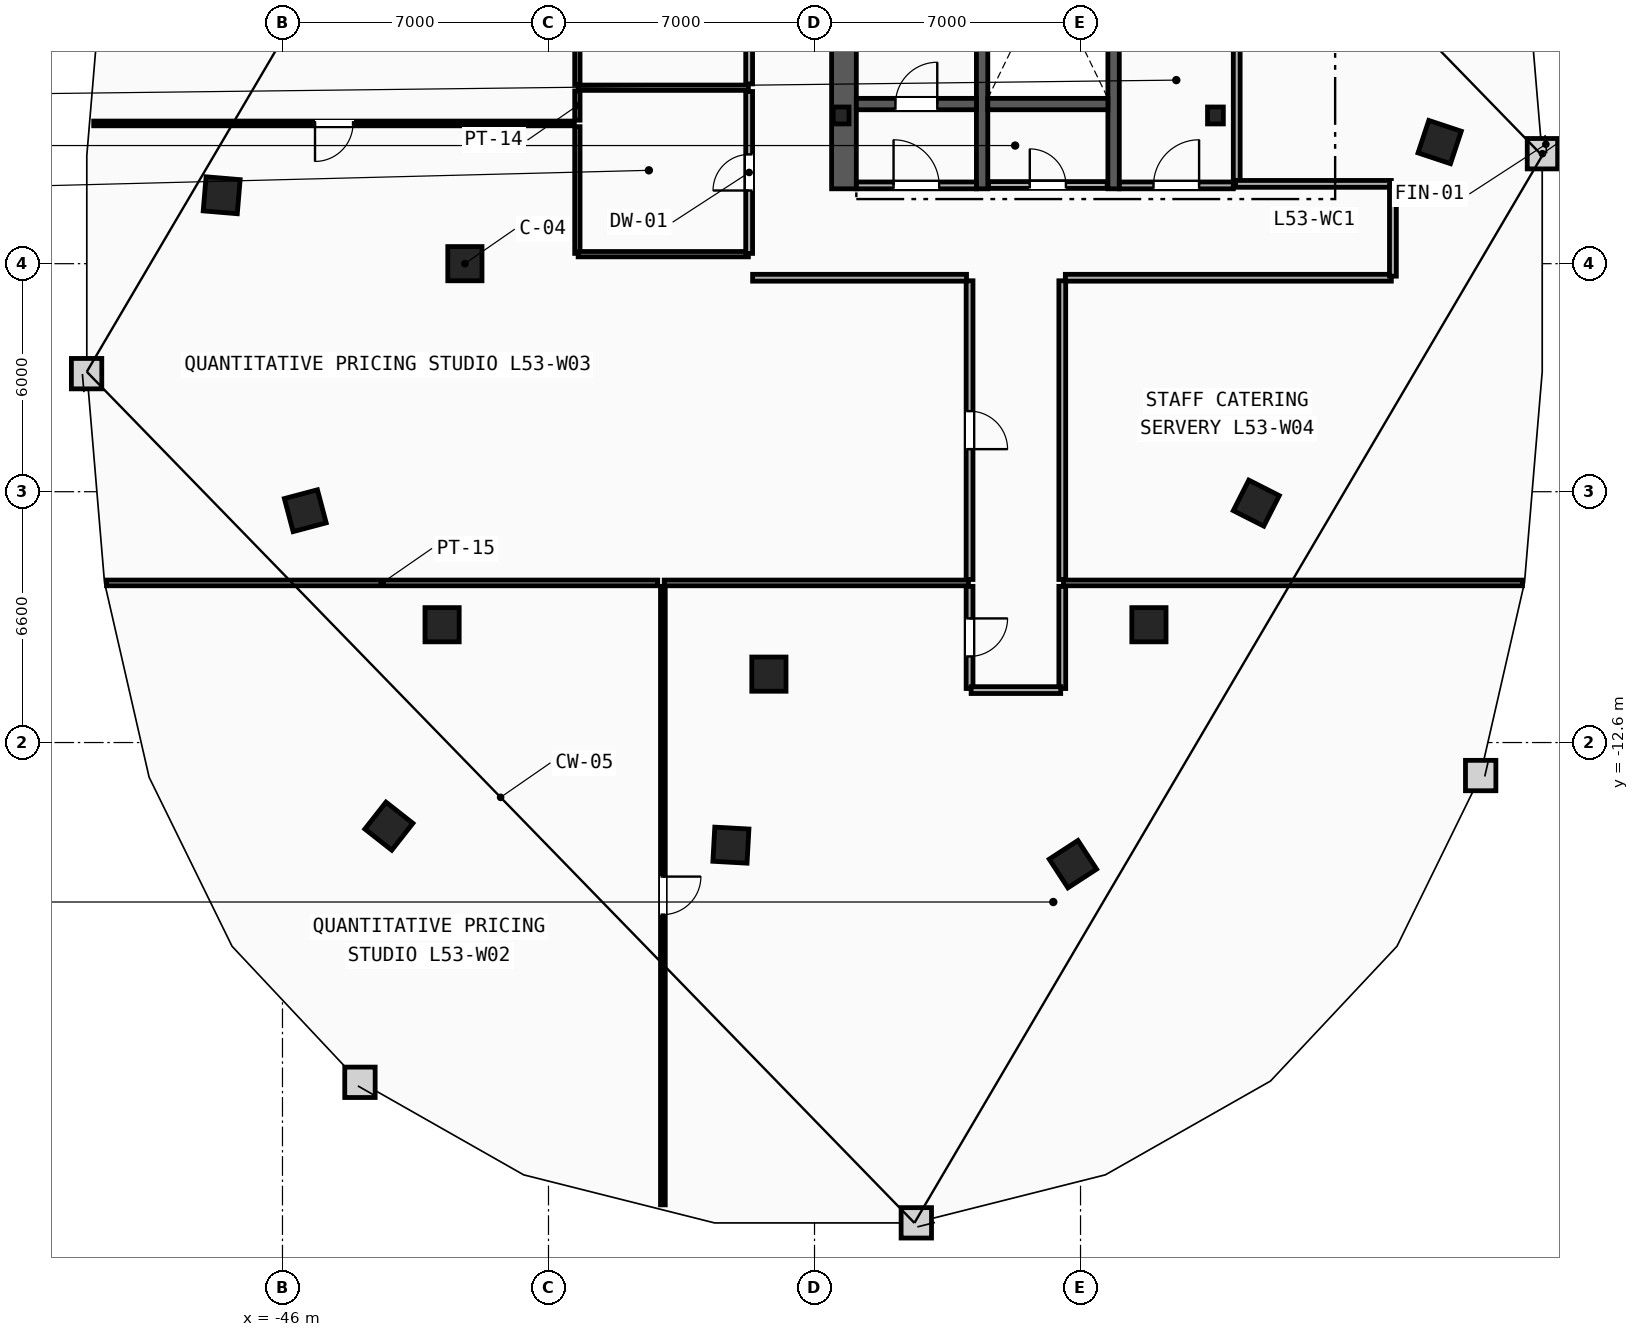
"""IFC4 building model, lengths in metres.
Left out: names, types, materials, properties, quantities, classifications, styles, units other than length and angle.
Written with IfcOpenShell. Run it as: python <this file> out.ifc"""

import sys

from ifc_helpers import new_model, si_unit, direction, frame, frame_2d, origin, origin_2d, place, context, subcontext, project, spatial, rectangle, i_section, extrude, element, fill, save


model = new_model("IFC4")
c1 = context("Model", 3, precision=1e-05, world=origin(), true_north=direction((0.0, 1.0)))
c2 = subcontext(c1, "Body", "Model", "MODEL_VIEW")
j1 = project(units=[si_unit("LENGTHUNIT", "METRE"), si_unit("PLANEANGLEUNIT", "RADIAN")], contexts=[c1])
p1 = place(None, origin())
s1 = spatial("IfcSite", under=j1, at=p1, CompositionType="ELEMENT")
p2 = place(p1, origin())
s2 = spatial("IfcBuilding", under=s1, at=p2, CompositionType="ELEMENT")
p3 = place(p2, frame((0.0, 0.0, 202.6)))
s3 = spatial("IfcBuildingStorey", under=s2, at=p3, CompositionType="ELEMENT", Elevation=202.6)
for number, where, z_axis, x_axis in (
    (1, (-31.3, 3.9, 0.0), (0.0, 0.0, 1.0), (1.0, 0.0, 0.0)),
    (2, (-21.45, 3.9, 0.0), (0.0, 0.0, 1.0), (1.0, 0.0, 0.0)),
):
    element("IfcColumn", number, at=place(p3, frame(where, z_axis=z_axis, x_axis=x_axis)), inside=s3, PredefinedType="COLUMN", context=c2, shape_type="SweptSolid", body=[
        extrude(i_section(OverallWidth=0.416, OverallDepth=0.446, WebThickness=0.039, FlangeThickness=0.063, FilletRadius=0.018, at=origin_2d()), origin(), (0.0, 0.0, 1.0), 3.6),
    ])
for number, where, z_axis, x_axis in (
    (3, (-41.2, 0.0, 0.0), (0.0, 0.0, 1.0), (1.0, 0.0, 0.0)),
    (4, (-41.8, -9.5, 0.0), (0.0, 0.0, 1.0), (1.0, 0.0, 0.0)),
    (5, (-33.2, -10.8, 0.0), (0.0, 0.0, 1.0), (1.0, 0.0, 0.0)),
    (6, (-23.2, -9.5, 0.0), (0.0, 0.0, 1.0), (1.0, 0.0, 0.0)),
    (7, (-15.55, 3.2, 0.0), (0.0, 0.0, 1.0), (0.315, 0.949, 0.0)),
    (8, (-47.6, 1.8, 0.0), (0.0, 0.0, 1.0), (-0.084, -0.997, 0.0)),
    (9, (-45.4, -6.5, 0.0), (0.0, 0.0, 1.0), (0.256, -0.967, 0.0)),
    (10, (-43.2, -14.8, 0.0), (0.0, 0.0, 1.0), (0.786, -0.618, 0.0)),
    (11, (-34.2, -15.3, 0.0), (0.0, 0.0, 1.0), (0.998, -0.055, 0.0)),
    (12, (-25.2, -15.8, 0.0), (0.0, 0.0, 1.0), (0.838, 0.546, 0.0)),
    (13, (-20.375, -6.3, 0.0), (0.0, 0.0, 1.0), (0.453, 0.892, 0.0)),
):
    element("IfcColumn", number, at=place(p3, frame(where, z_axis=z_axis, x_axis=x_axis)), inside=s3, PredefinedType="COLUMN", context=c2, shape_type="SweptSolid", body=[
        extrude(rectangle(XDim=0.9, YDim=0.9, at=origin_2d()), origin(), (0.0, 0.0, 1.0), 3.6),
    ])
p4 = place(p3, frame((-31.225, 1.97, 0.0), z_axis=(0.0, 0.0, 1.0), x_axis=(0.0, 1.0, 0.0)))
e14 = element("IfcWall", 14, at=p4, inside=s3, PredefinedType="SHEAR", context=c2, shape_type="SweptSolid", body=[
    extrude(rectangle(XDim=13.33, YDim=0.65, at=frame_2d((6.665, 0.0))), origin(), (0.0, 0.0, 1.0), 3.34),
])
for number, where, z_axis, x_axis in (
    (15, (-27.59, 1.97, 0.0), (0.0, 0.0, 1.0), (0.0, 1.0, 0.0)),
    (16, (-24.13, 1.97, 0.0), (0.0, 0.0, 1.0), (0.0, 1.0, 0.0)),
):
    element("IfcWall", number, at=place(p3, frame(where, z_axis=z_axis, x_axis=x_axis)), inside=s3, PredefinedType="SHEAR", context=c2, shape_type="SweptSolid", body=[
        extrude(rectangle(XDim=10.68, YDim=0.3, at=frame_2d((5.34, 0.0))), origin(), (0.0, 0.0, 1.0), 3.34),
    ])
p5 = place(p3, frame((-30.9, 4.2, 0.0), z_axis=(0.0, 0.0, 1.0), x_axis=(1.0, 0.0, 0.0)))
e17 = element("IfcWall", 17, at=p5, inside=s3, PredefinedType="SHEAR", context=c2, shape_type="SweptSolid", body=[
    extrude(rectangle(XDim=3.16, YDim=0.3, at=frame_2d((1.58, 0.0))), origin(), (0.0, 0.0, 1.0), 3.34),
])
p6 = place(p5, frame((1.03, 0.0, 0.0)))
e18 = element("IfcOpeningElement", 18, at=p6, cuts=e17, PredefinedType="OPENING", context=c2, shape_type="SweptSolid", body=[
    extrude(rectangle(XDim=1.1, YDim=2.15, at=frame_2d((0.55, 1.075))), frame((0.0, 0.16, 0.0), z_axis=(0.0, -1.0, 0.0), x_axis=(1.0, 0.0, 0.0)), (0.0, 0.0, 1.0), 0.32),
])
p7 = place(p3, frame((-27.44, 4.2, 0.0), z_axis=(0.0, 0.0, 1.0), x_axis=(1.0, 0.0, 0.0)))
e19 = element("IfcWall", 19, at=p7, inside=s3, PredefinedType="SHEAR", context=c2, shape_type="SweptSolid", body=[
    extrude(rectangle(XDim=3.16, YDim=0.3, at=frame_2d((1.58, 0.0))), origin(), (0.0, 0.0, 1.0), 3.34),
])
p8 = place(p3, frame((-20.89, 2.15, 0.0), z_axis=(0.0, 0.0, 1.0), x_axis=(0.0, 1.0, 0.0)))
e20 = element("IfcWall", 20, at=p8, inside=s3, PredefinedType="PARTITIONING", context=c2, shape_type="SweptSolid", body=[
    extrude(rectangle(XDim=5.3, YDim=0.18, at=frame_2d((2.65, 0.0))), origin(), (0.0, 0.0, 1.0), 3.34),
])
p9 = place(p3, frame((-23.98, 2.06, 0.0), z_axis=(0.0, 0.0, 1.0), x_axis=(1.0, 0.0, 0.0)))
e21 = element("IfcWall", 21, at=p9, inside=s3, PredefinedType="PARTITIONING", context=c2, shape_type="SweptSolid", body=[
    extrude(rectangle(XDim=3.0, YDim=0.18, at=frame_2d((1.5, 0.0))), origin(), (0.0, 0.0, 1.0), 3.34),
])
p10 = place(p9, frame((0.9, 0.0, 0.0)))
e22 = element("IfcOpeningElement", 22, at=p10, cuts=e21, PredefinedType="OPENING", context=c2, shape_type="SweptSolid", body=[
    extrude(rectangle(XDim=1.2, YDim=2.15, at=frame_2d((0.6, 1.075))), frame((0.0, 0.1, 0.0), z_axis=(0.0, -1.0, 0.0), x_axis=(1.0, 0.0, 0.0)), (0.0, 0.0, 1.0), 0.2),
])
p11 = place(p3, frame((-30.9, 2.06, 0.0), z_axis=(0.0, 0.0, 1.0), x_axis=(1.0, 0.0, 0.0)))
e23 = element("IfcWall", 23, at=p11, inside=s3, PredefinedType="PARTITIONING", context=c2, shape_type="SweptSolid", body=[
    extrude(rectangle(XDim=3.16, YDim=0.18, at=frame_2d((1.58, 0.0))), origin(), (0.0, 0.0, 1.0), 3.34),
])
p12 = place(p11, frame((0.98, 0.0, 0.0)))
e24 = element("IfcOpeningElement", 24, at=p12, cuts=e23, PredefinedType="OPENING", context=c2, shape_type="SweptSolid", body=[
    extrude(rectangle(XDim=1.2, YDim=2.15, at=frame_2d((0.6, 1.075))), frame((0.0, 0.1, 0.0), z_axis=(0.0, -1.0, 0.0), x_axis=(1.0, 0.0, 0.0)), (0.0, 0.0, 1.0), 0.2),
])
p13 = place(p3, frame((-27.42, 2.07, 0.0), z_axis=(0.0, 0.0, 1.0), x_axis=(1.0, 0.0, 0.0)))
e25 = element("IfcWall", 25, at=p13, inside=s3, PredefinedType="PARTITIONING", context=c2, shape_type="SweptSolid", body=[
    extrude(rectangle(XDim=3.12, YDim=0.18, at=frame_2d((1.56, 0.0))), origin(), (0.0, 0.0, 1.0), 3.34),
])
p14 = place(p13, frame((1.085, 0.0, 0.0)))
e26 = element("IfcOpeningElement", 26, at=p14, cuts=e25, PredefinedType="OPENING", context=c2, shape_type="SweptSolid", body=[
    extrude(rectangle(XDim=0.95, YDim=2.1, at=frame_2d((0.475, 1.05))), frame((0.0, 0.1, 0.0), z_axis=(0.0, -1.0, 0.0), x_axis=(1.0, 0.0, 0.0)), (0.0, 0.0, 1.0), 0.2),
])
p15 = place(p3, frame((-38.24, 0.27, 0.0), z_axis=(0.0, 0.0, 1.0), x_axis=(0.0, 1.0, 0.0)))
e27 = element("IfcWall", 27, at=p15, inside=s3, PredefinedType="PARTITIONING", context=c2, shape_type="SweptSolid", body=[
    extrude(rectangle(XDim=3.335, YDim=0.14, at=frame_2d((1.667, 0.0))), origin(), (0.0, 0.0, 1.0), 3.34),
])
p16 = place(p3, frame((-38.24, 3.775, 0.0), z_axis=(0.0, 0.0, 1.0), x_axis=(0.0, 1.0, 0.0)))
e28 = element("IfcWall", 28, at=p16, inside=s3, PredefinedType="PARTITIONING", context=c2, shape_type="SweptSolid", body=[
    extrude(rectangle(XDim=0.77, YDim=0.14, at=frame_2d((0.385, 0.0))), origin(), (0.0, 0.0, 1.0), 3.34),
])
p17 = place(p3, frame((-38.24, 4.715, 0.0), z_axis=(0.0, 0.0, 1.0), x_axis=(0.0, 1.0, 0.0)))
e29 = element("IfcWall", 29, at=p17, inside=s3, PredefinedType="PARTITIONING", context=c2, shape_type="SweptSolid", body=[
    extrude(rectangle(XDim=3.74, YDim=0.14, at=frame_2d((1.87, 0.0))), origin(), (0.0, 0.0, 1.0), 3.34),
])
for number, where, z_axis, x_axis in (
    (30, (-38.22, 0.25, 0.0), (0.0, 0.0, 1.0), (1.0, 0.0, 0.0)),
    (31, (-38.22, 4.63, 0.0), (0.0, 0.0, 1.0), (1.0, 0.0, 0.0)),
):
    element("IfcWall", number, at=place(p3, frame(where, z_axis=z_axis, x_axis=x_axis)), inside=s3, PredefinedType="PARTITIONING", context=c2, shape_type="SweptSolid", body=[
        extrude(rectangle(XDim=4.48, YDim=0.14, at=frame_2d((2.24, 0.0))), origin(), (0.0, 0.0, 1.0), 3.34),
    ])
p18 = place(p3, frame((-33.72, 0.27, 0.0), z_axis=(0.0, 0.0, 1.0), x_axis=(0.0, 1.0, 0.0)))
e32 = element("IfcWall", 32, at=p18, inside=s3, PredefinedType="PARTITIONING", context=c2, shape_type="SweptSolid", body=[
    extrude(rectangle(XDim=4.26, YDim=0.18, at=frame_2d((2.13, 0.0))), origin(), (0.0, 0.0, 1.0), 3.34),
])
p19 = place(p18, frame((1.655, 0.0, 0.0)))
e33 = element("IfcOpeningElement", 33, at=p19, cuts=e32, PredefinedType="OPENING", context=c2, shape_type="SweptSolid", body=[
    extrude(rectangle(XDim=0.95, YDim=2.1, at=frame_2d((0.475, 1.05))), frame((0.0, 0.1, 0.0), z_axis=(0.0, -1.0, 0.0), x_axis=(1.0, 0.0, 0.0)), (0.0, 0.0, 1.0), 0.2),
])
p20 = place(p3, frame((-33.72, 4.73, 0.0), z_axis=(0.0, 0.0, 1.0), x_axis=(0.0, 1.0, 0.0)))
e34 = element("IfcWall", 34, at=p20, inside=s3, PredefinedType="PARTITIONING", context=c2, shape_type="SweptSolid", body=[
    extrude(rectangle(XDim=4.16, YDim=0.18, at=frame_2d((2.08, 0.0))), origin(), (0.0, 0.0, 1.0), 3.34),
])
p21 = place(p20, frame((1.58, 0.0, 0.0)))
e35 = element("IfcOpeningElement", 35, at=p21, cuts=e34, PredefinedType="OPENING", context=c2, shape_type="SweptSolid", body=[
    extrude(rectangle(XDim=1.0, YDim=2.15, at=frame_2d((0.5, 1.075))), frame((0.0, 0.1, 0.0), z_axis=(0.0, -1.0, 0.0), x_axis=(1.0, 0.0, 0.0)), (0.0, 0.0, 1.0), 0.2),
])
p22 = place(p3, frame((-50.63, -8.4, 0.0), z_axis=(0.0, 0.0, 1.0), x_axis=(1.0, 0.0, 0.0)))
e36 = element("IfcWall", 36, at=p22, inside=s3, PredefinedType="PARTITIONING", context=c2, shape_type="SweptSolid", body=[
    extrude(rectangle(XDim=14.505, YDim=0.15, at=frame_2d((7.252, 0.0))), origin(), (0.0, 0.0, 1.0), 3.34),
])
p23 = place(p3, frame((-35.955, -8.4, 0.0), z_axis=(0.0, 0.0, 1.0), x_axis=(1.0, 0.0, 0.0)))
e37 = element("IfcWall", 37, at=p23, inside=s3, PredefinedType="PARTITIONING", context=c2, shape_type="SweptSolid", body=[
    extrude(rectangle(XDim=8.005, YDim=0.15, at=frame_2d((4.002, 0.0))), origin(), (0.0, 0.0, 1.0), 3.34),
])
p24 = place(p3, frame((-25.45, -8.4, 0.0), z_axis=(0.0, 0.0, 1.0), x_axis=(1.0, 0.0, 0.0)))
e38 = element("IfcWall", 38, at=p24, inside=s3, PredefinedType="PARTITIONING", context=c2, shape_type="SweptSolid", body=[
    extrude(rectangle(XDim=12.08, YDim=0.15, at=frame_2d((6.04, 0.0))), origin(), (0.0, 0.0, 1.0), 3.34),
])
p25 = place(p3, frame((-27.92, -8.49, 0.0), z_axis=(0.0, 0.0, 1.0), x_axis=(0.0, -1.0, 0.0)))
e39 = element("IfcWall", 39, at=p25, inside=s3, PredefinedType="PARTITIONING", context=c2, shape_type="SweptSolid", body=[
    extrude(rectangle(XDim=2.688, YDim=0.18, at=frame_2d((1.344, 0.0))), origin(), (0.0, 0.0, 1.0), 3.34),
])
p26 = place(p25, frame((0.844, 0.0, 0.0)))
e40 = element("IfcOpeningElement", 40, at=p26, cuts=e39, PredefinedType="OPENING", context=c2, shape_type="SweptSolid", body=[
    extrude(rectangle(XDim=1.0, YDim=2.15, at=frame_2d((0.5, 1.075))), frame((0.0, 0.1, 0.0), z_axis=(0.0, -1.0, 0.0), x_axis=(1.0, 0.0, 0.0)), (0.0, 0.0, 1.0), 0.2),
])
p27 = place(p3, frame((-25.48, -11.178, 0.0), z_axis=(0.0, 0.0, 1.0), x_axis=(0.0, 1.0, 0.0)))
e41 = element("IfcWall", 41, at=p27, inside=s3, PredefinedType="PARTITIONING", context=c2, shape_type="SweptSolid", body=[
    extrude(rectangle(XDim=2.688, YDim=0.18, at=frame_2d((1.344, 0.0))), origin(), (0.0, 0.0, 1.0), 3.34),
])
p28 = place(p3, frame((-27.878, -11.22, 0.0), z_axis=(0.0, 0.0, 1.0), x_axis=(1.0, 0.0, 0.0)))
e42 = element("IfcWall", 42, at=p28, inside=s3, PredefinedType="PARTITIONING", context=c2, shape_type="SweptSolid", body=[
    extrude(rectangle(XDim=2.357, YDim=0.18, at=frame_2d((1.178, 0.0))), origin(), (0.0, 0.0, 1.0), 3.34),
])
p29 = place(p3, frame((-27.92, -0.45, 0.0), z_axis=(0.0, 0.0, 1.0), x_axis=(0.0, -1.0, 0.0)))
e43 = element("IfcWall", 43, at=p29, inside=s3, PredefinedType="PARTITIONING", context=c2, shape_type="SweptSolid", body=[
    extrude(rectangle(XDim=7.86, YDim=0.18, at=frame_2d((3.93, 0.0))), origin(), (0.0, 0.0, 1.0), 3.34),
])
p30 = place(p29, frame((3.43, 0.0, 0.0)))
e44 = element("IfcOpeningElement", 44, at=p30, cuts=e43, PredefinedType="OPENING", context=c2, shape_type="SweptSolid", body=[
    extrude(rectangle(XDim=1.0, YDim=2.15, at=frame_2d((0.5, 1.075))), frame((0.0, 0.1, 0.0), z_axis=(0.0, -1.0, 0.0), x_axis=(1.0, 0.0, 0.0)), (0.0, 0.0, 1.0), 0.2),
])
p31 = place(p3, frame((-33.628, -0.37, 0.0), z_axis=(0.0, 0.0, 1.0), x_axis=(1.0, 0.0, 0.0)))
e45 = element("IfcWall", 45, at=p31, inside=s3, PredefinedType="PARTITIONING", context=c2, shape_type="SweptSolid", body=[
    extrude(rectangle(XDim=5.628, YDim=0.18, at=frame_2d((2.814, 0.0))), origin(), (0.0, 0.0, 1.0), 3.34),
])
p32 = place(p3, frame((-25.4, -0.37, 0.0), z_axis=(0.0, 0.0, 1.0), x_axis=(1.0, 0.0, 0.0)))
e46 = element("IfcWall", 46, at=p32, inside=s3, PredefinedType="PARTITIONING", context=c2, shape_type="SweptSolid", body=[
    extrude(rectangle(XDim=8.578, YDim=0.18, at=frame_2d((4.289, 0.0))), origin(), (0.0, 0.0, 1.0), 3.34),
])
p33 = place(p3, frame((-25.48, -8.31, 0.0), z_axis=(0.0, 0.0, 1.0), x_axis=(0.0, 1.0, 0.0)))
e47 = element("IfcWall", 47, at=p33, inside=s3, PredefinedType="PARTITIONING", context=c2, shape_type="SweptSolid", body=[
    extrude(rectangle(XDim=7.86, YDim=0.18, at=frame_2d((3.93, 0.0))), origin(), (0.0, 0.0, 1.0), 3.34),
])
p34 = place(p3, frame((-16.822, 2.1, 0.0), z_axis=(0.0, 0.0, 1.0), x_axis=(-1.0, 0.0, 0.0)))
e48 = element("IfcWall", 48, at=p34, inside=s3, PredefinedType="PARTITIONING", context=c2, shape_type="SweptSolid", body=[
    extrude(rectangle(XDim=4.098, YDim=0.18, at=frame_2d((2.049, 0.0))), origin(), (0.0, 0.0, 1.0), 3.34),
])
p35 = place(p3, frame((-16.78, -0.329, 0.0), z_axis=(0.0, 0.0, 1.0), x_axis=(0.0, 1.0, 0.0)))
e49 = element("IfcWall", 49, at=p35, inside=s3, PredefinedType="PARTITIONING", context=c2, shape_type="SweptSolid", body=[
    extrude(rectangle(XDim=2.387, YDim=0.18, at=frame_2d((1.194, 0.0))), origin(), (0.0, 0.0, 1.0), 3.34),
])
p36 = place(p3, frame((-35.99, -8.49, 0.0), z_axis=(0.0, 0.0, 1.0), x_axis=(0.0, -1.0, 0.0)))
e50 = element("IfcWall", 50, at=p36, inside=s3, PredefinedType="PARTITIONING", context=c2, shape_type="SweptSolid", body=[
    extrude(rectangle(XDim=16.275, YDim=0.125, at=frame_2d((8.137, 0.0))), origin(), (0.0, 0.0, 1.0), 3.34),
])
p37 = place(p36, frame((7.637, 0.0, 0.0)))
e51 = element("IfcOpeningElement", 51, at=p37, cuts=e50, PredefinedType="OPENING", context=c2, shape_type="SweptSolid", body=[
    extrude(rectangle(XDim=1.0, YDim=2.15, at=frame_2d((0.5, 1.075))), frame((0.0, 0.073, 0.0), z_axis=(0.0, -1.0, 0.0), x_axis=(1.0, 0.0, 0.0)), (0.0, 0.0, 1.0), 0.145),
])
p38 = place(p3, frame((-38.32, 3.69, 0.0), z_axis=(0.0, 0.0, 1.0), x_axis=(-1.0, 0.0, 0.0)))
e52 = element("IfcWall", 52, at=p38, inside=s3, PredefinedType="PARTITIONING", context=c2, shape_type="SweptSolid", body=[
    extrude(rectangle(XDim=12.647, YDim=0.125, at=frame_2d((6.324, 0.0))), origin(), (0.0, 0.0, 1.0), 3.34),
])
p39 = place(p38, frame((5.824, 0.0, 0.0)))
e53 = element("IfcOpeningElement", 53, at=p39, cuts=e52, PredefinedType="OPENING", context=c2, shape_type="SweptSolid", body=[
    extrude(rectangle(XDim=1.0, YDim=2.15, at=frame_2d((0.5, 1.075))), frame((0.0, 0.073, 0.0), z_axis=(0.0, -1.0, 0.0), x_axis=(1.0, 0.0, 0.0)), (0.0, 0.0, 1.0), 0.145),
])
p40 = place(p6, origin())
e54 = element("IfcDoor", 54, at=p40, inside=s3, OperationType="SINGLE_SWING_RIGHT", PredefinedType="DOOR", context=c2, shape_type="SweptSolid", body=[
    extrude(rectangle(XDim=1.1, YDim=2.15, at=frame_2d((0.55, 1.075))), frame((0.0, 0.025, 0.0), z_axis=(0.0, -1.0, 0.0), x_axis=(1.0, 0.0, 0.0)), (0.0, 0.0, 1.0), 0.05),
])
fill(e18, e54)
p41 = place(p10, origin())
e55 = element("IfcDoor", 55, at=p41, inside=s3, OperationType="SINGLE_SWING_RIGHT", PredefinedType="DOOR", context=c2, shape_type="SweptSolid", body=[
    extrude(rectangle(XDim=1.2, YDim=2.15, at=frame_2d((0.6, 1.075))), frame((0.0, 0.025, 0.0), z_axis=(0.0, -1.0, 0.0), x_axis=(1.0, 0.0, 0.0)), (0.0, 0.0, 1.0), 0.05),
])
fill(e22, e55)
p42 = place(p12, origin())
e56 = element("IfcDoor", 56, at=p42, inside=s3, OperationType="SINGLE_SWING_LEFT", PredefinedType="DOOR", context=c2, shape_type="SweptSolid", body=[
    extrude(rectangle(XDim=1.2, YDim=2.15, at=frame_2d((0.6, 1.075))), frame((0.0, 0.025, 0.0), z_axis=(0.0, -1.0, 0.0), x_axis=(1.0, 0.0, 0.0)), (0.0, 0.0, 1.0), 0.05),
])
fill(e24, e56)
p43 = place(p37, origin())
e57 = element("IfcDoor", 57, at=p43, inside=s3, OperationType="SINGLE_SWING_LEFT", PredefinedType="DOOR", context=c2, shape_type="SweptSolid", body=[
    extrude(rectangle(XDim=1.0, YDim=2.15, at=frame_2d((0.5, 1.075))), frame((0.0, 0.025, 0.0), z_axis=(0.0, -1.0, 0.0), x_axis=(1.0, 0.0, 0.0)), (0.0, 0.0, 1.0), 0.05),
])
fill(e51, e57)
p44 = place(p39, origin())
e58 = element("IfcDoor", 58, at=p44, inside=s3, OperationType="SINGLE_SWING_RIGHT", PredefinedType="DOOR", context=c2, shape_type="SweptSolid", body=[
    extrude(rectangle(XDim=1.0, YDim=2.15, at=frame_2d((0.5, 1.075))), frame((0.0, 0.025, 0.0), z_axis=(0.0, -1.0, 0.0), x_axis=(1.0, 0.0, 0.0)), (0.0, 0.0, 1.0), 0.05),
])
fill(e53, e58)
p45 = place(p30, origin())
e59 = element("IfcDoor", 59, at=p45, inside=s3, OperationType="SINGLE_SWING_RIGHT", PredefinedType="DOOR", context=c2, shape_type="SweptSolid", body=[
    extrude(rectangle(XDim=1.0, YDim=2.15, at=frame_2d((0.5, 1.075))), frame((0.0, 0.025, 0.0), z_axis=(0.0, -1.0, 0.0), x_axis=(1.0, 0.0, 0.0)), (0.0, 0.0, 1.0), 0.05),
])
fill(e44, e59)
p46 = place(p19, origin())
e60 = element("IfcDoor", 60, at=p46, inside=s3, OperationType="SINGLE_SWING_LEFT", PredefinedType="DOOR", context=c2, shape_type="SweptSolid", body=[
    extrude(rectangle(XDim=0.95, YDim=2.1, at=frame_2d((0.475, 1.05))), frame((0.0, 0.025, 0.0), z_axis=(0.0, -1.0, 0.0), x_axis=(1.0, 0.0, 0.0)), (0.0, 0.0, 1.0), 0.05),
])
fill(e33, e60)
p47 = place(p14, origin())
e61 = element("IfcDoor", 61, at=p47, inside=s3, OperationType="SINGLE_SWING_LEFT", PredefinedType="DOOR", context=c2, shape_type="SweptSolid", body=[
    extrude(rectangle(XDim=0.95, YDim=2.1, at=frame_2d((0.475, 1.05))), frame((0.0, 0.025, 0.0), z_axis=(0.0, -1.0, 0.0), x_axis=(1.0, 0.0, 0.0)), (0.0, 0.0, 1.0), 0.05),
])
fill(e26, e61)
p48 = place(p26, origin())
e62 = element("IfcDoor", 62, at=p48, inside=s3, OperationType="SINGLE_SWING_LEFT", PredefinedType="DOOR", context=c2, shape_type="SweptSolid", body=[
    extrude(rectangle(XDim=1.0, YDim=2.15, at=frame_2d((0.5, 1.075))), frame((0.0, 0.025, 0.0), z_axis=(0.0, -1.0, 0.0), x_axis=(1.0, 0.0, 0.0)), (0.0, 0.0, 1.0), 0.05),
])
fill(e40, e62)
save(model, sys.argv[1])
